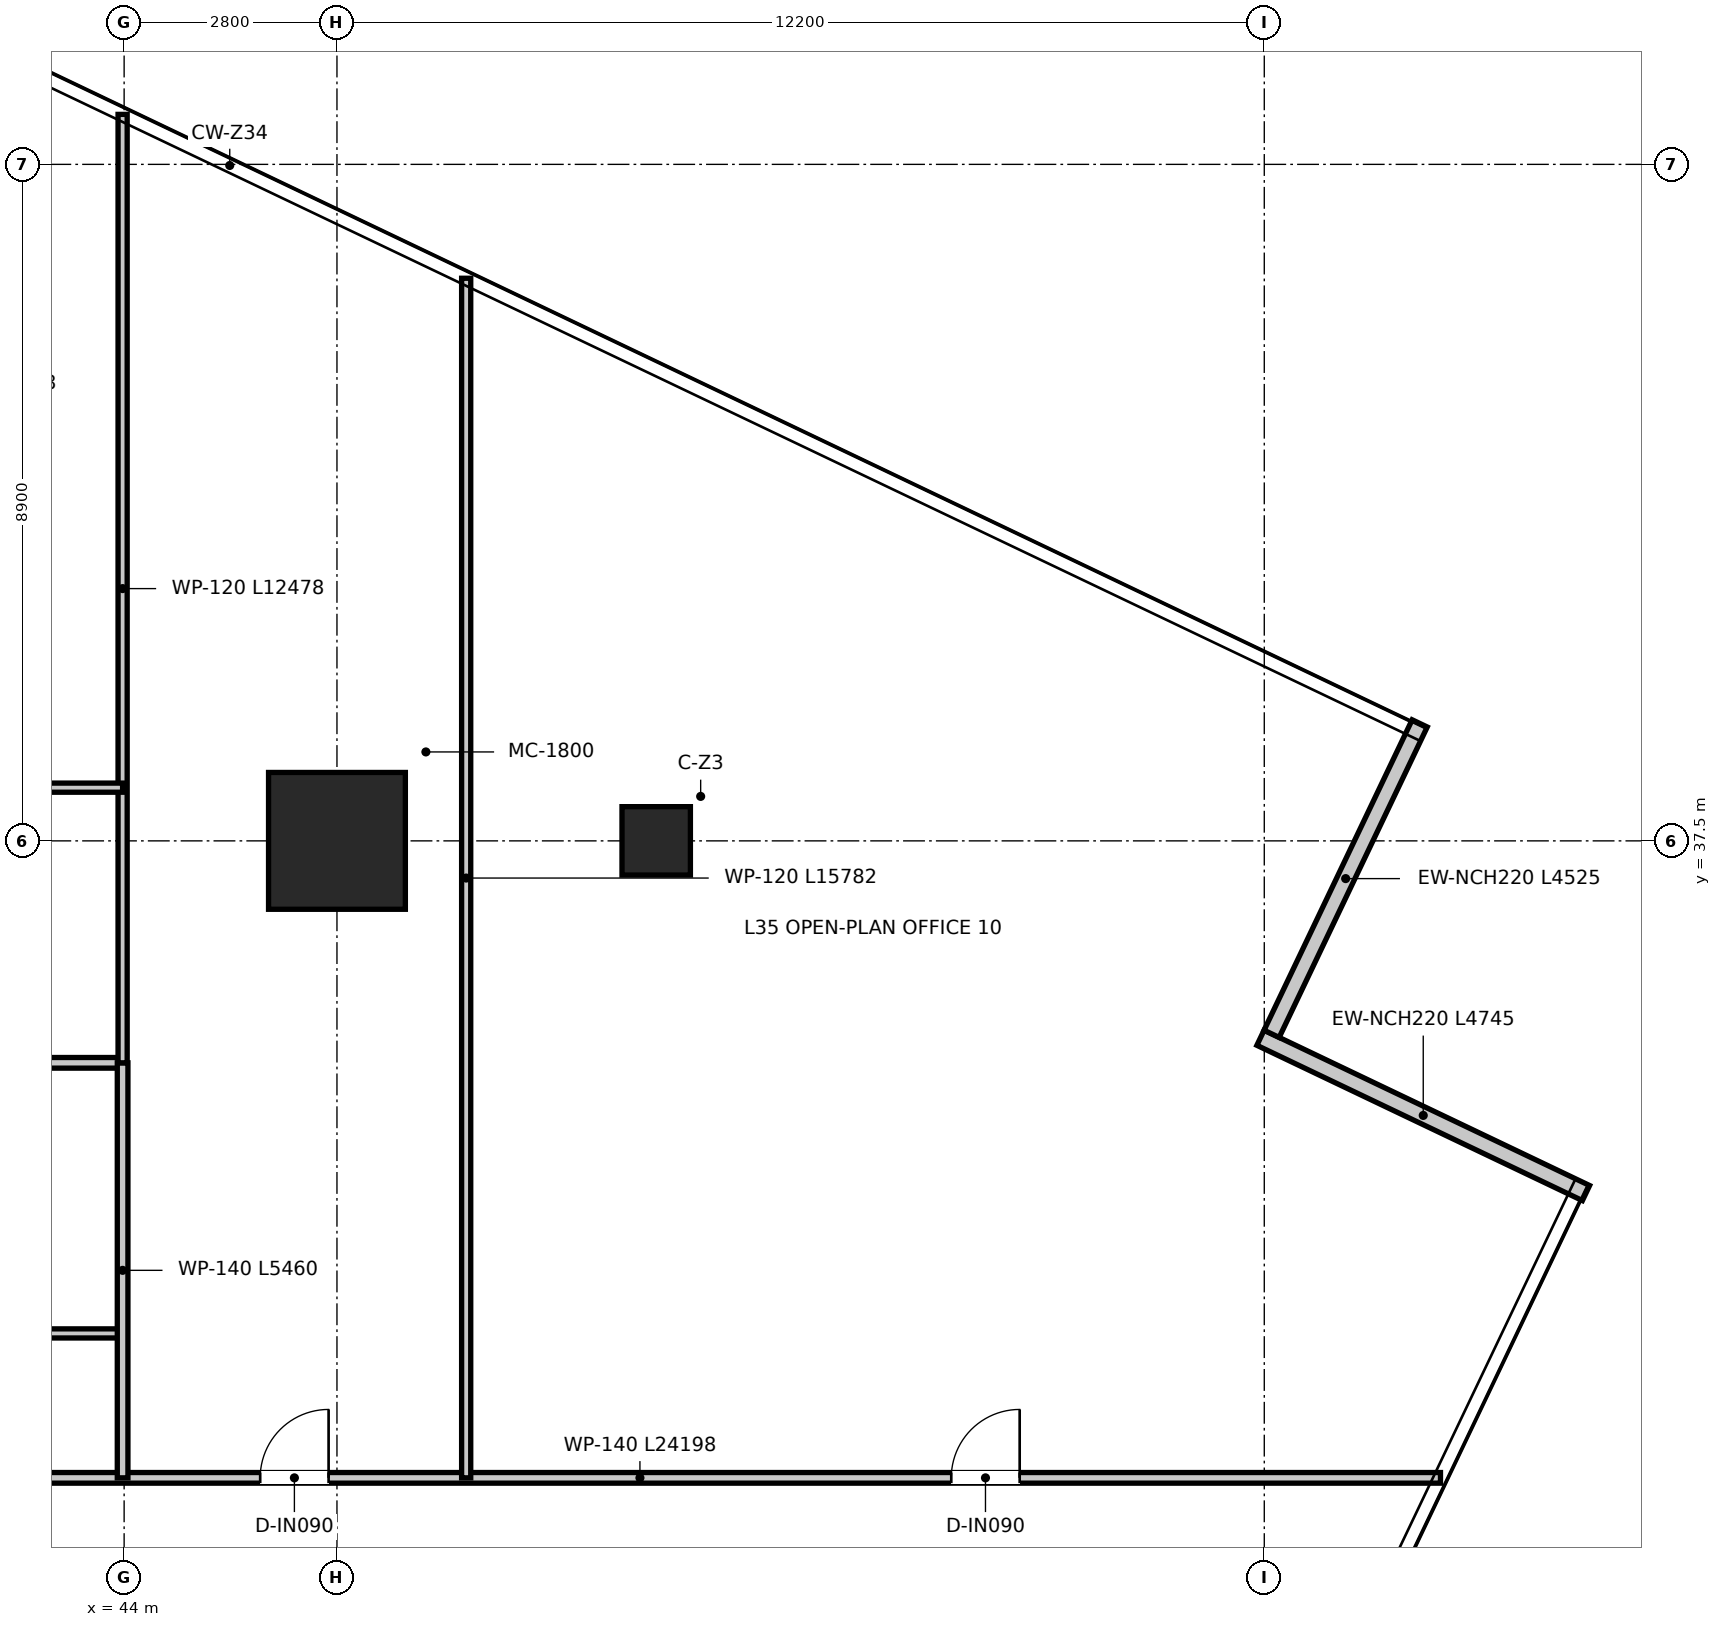
"""IFC4 building model, lengths in metres.
Left out: names, types, materials, properties, quantities, classifications, styles, units other than length and angle.
Written with IfcOpenShell. Run it as: python <this file> out.ifc"""

import sys

from ifc_helpers import new_model, si_unit, direction, frame, frame_2d, origin, origin_2d, place, context, subcontext, project, spatial, rectangle, extrude, source, transform, mapped, element, fill, save


model = new_model("IFC4")
c1 = context("Model", 3, precision=1e-05, world=origin(), true_north=direction((0.0, 1.0)))
c2 = subcontext(c1, "Body", "Model", "MODEL_VIEW")
j1 = project(units=[si_unit("LENGTHUNIT", "METRE"), si_unit("PLANEANGLEUNIT", "RADIAN")], contexts=[c1])
p1 = place(None, origin())
s1 = spatial("IfcSite", under=j1, at=p1, CompositionType="ELEMENT")
p2 = place(p1, origin())
s2 = spatial("IfcBuilding", under=s1, at=p2, CompositionType="ELEMENT")
p3 = place(p2, frame((0.0, 0.0, 146.2)))
s3 = spatial("IfcBuildingStorey", under=s2, at=p3, CompositionType="ELEMENT", Elevation=146.2)
m1 = source(origin(), c2, "Body", "SweptSolid", [
    extrude(rectangle(XDim=1.8, YDim=1.8, at=origin_2d()), origin(), (0.0, 0.0, 1.0), 3.95),
])
p4 = place(p3, frame((46.8, 37.5, 0.0), z_axis=(0.0, 0.0, 1.0), x_axis=(1.0, 0.0, 0.0)))
e1 = element("IfcColumn", 1, at=p4, inside=s3, PredefinedType="USERDEFINED", context=c2, shape_type="MappedRepresentation", body=[
    mapped(m1, transform((0.0, 0.0, 0.0), x_axis=(1.0, 0.0, 0.0), y_axis=(0.0, 1.0, 0.0), z_axis=(0.0, 0.0, 1.0), scale=1.0)),
])
m2 = source(origin(), c2, "Body", "SweptSolid", [
    extrude(rectangle(XDim=0.9, YDim=0.9, at=origin_2d()), origin(), (0.0, 0.0, 1.0), 3.95),
])
p5 = place(p3, frame((51.0, 37.5, 0.0), z_axis=(0.0, 0.0, 1.0), x_axis=(1.0, 0.0, 0.0)))
e2 = element("IfcColumn", 2, at=p5, inside=s3, PredefinedType="COLUMN", context=c2, shape_type="MappedRepresentation", body=[
    mapped(m2, transform((0.0, 0.0, 0.0), x_axis=(1.0, 0.0, 0.0), y_axis=(0.0, 1.0, 0.0), z_axis=(0.0, 0.0, 1.0), scale=1.0)),
])
p6 = place(p3, frame((63.233, 32.867, 0.0), z_axis=(0.0, 0.0, 1.0), x_axis=(-0.902587379521, 0.430506704164, 0.0)))
e3 = element("IfcWall", 3, at=p6, inside=s3, PredefinedType="ELEMENTEDWALL", context=c2, shape_type="SweptSolid", body=[
    extrude(rectangle(XDim=4.745, YDim=0.22, at=frame_2d((2.373, 0.0))), origin(), (0.0, 0.0, 1.0), 3.67),
])
p7 = place(p3, frame((59.097, 34.961, 0.0), z_axis=(0.0, 0.0, 1.0), x_axis=(0.43049686945, 0.902592070314, 0.0)))
e4 = element("IfcWall", 4, at=p7, inside=s3, PredefinedType="ELEMENTEDWALL", context=c2, shape_type="SweptSolid", body=[
    extrude(rectangle(XDim=4.525, YDim=0.22, at=frame_2d((2.262, 0.0))), origin(), (0.0, 0.0, 1.0), 3.67),
])
p8 = place(p3, frame((37.12, 29.12, 0.0), z_axis=(0.0, 0.0, 1.0), x_axis=(1.0, 0.0, 0.0)))
e5 = element("IfcWall", 5, at=p8, inside=s3, PredefinedType="PARTITIONING", context=c2, shape_type="SweptSolid", body=[
    extrude(rectangle(XDim=24.198, YDim=0.14, at=frame_2d((12.099, 0.0))), origin(), (0.0, 0.0, 1.0), 3.03),
])
p9 = place(p8, frame((3.03, 0.0, 0.0)))
e6 = element("IfcOpeningElement", 6, at=p9, cuts=e5, PredefinedType="OPENING", context=c2, shape_type="SweptSolid", body=[
    extrude(rectangle(XDim=0.9, YDim=2.1, at=frame_2d((0.45, 1.05))), frame((0.0, 0.08, 0.0), z_axis=(0.0, -1.0, 0.0), x_axis=(1.0, 0.0, 0.0)), (0.0, 0.0, 1.0), 0.16),
])
p10 = place(p8, frame((8.67, 0.0, 0.0)))
e7 = element("IfcOpeningElement", 7, at=p10, cuts=e5, PredefinedType="OPENING", context=c2, shape_type="SweptSolid", body=[
    extrude(rectangle(XDim=0.9, YDim=2.1, at=frame_2d((0.45, 1.05))), frame((0.0, 0.08, 0.0), z_axis=(0.0, -1.0, 0.0), x_axis=(1.0, 0.0, 0.0)), (0.0, 0.0, 1.0), 0.16),
])
p11 = place(p8, frame((17.762, 0.0, 0.0)))
e8 = element("IfcOpeningElement", 8, at=p11, cuts=e5, PredefinedType="OPENING", context=c2, shape_type="SweptSolid", body=[
    extrude(rectangle(XDim=0.9, YDim=2.1, at=frame_2d((0.45, 1.05))), frame((0.0, 0.08, 0.0), z_axis=(0.0, -1.0, 0.0), x_axis=(1.0, 0.0, 0.0)), (0.0, 0.0, 1.0), 0.16),
])
p12 = place(p3, frame((37.12, 31.02, 0.0), z_axis=(0.0, 0.0, 1.0), x_axis=(1.0, 0.0, 0.0)))
e9 = element("IfcWall", 9, at=p12, inside=s3, PredefinedType="PARTITIONING", context=c2, shape_type="SweptSolid", body=[
    extrude(rectangle(XDim=6.86, YDim=0.12, at=frame_2d((3.43, 0.0))), origin(), (0.0, 0.0, 1.0), 3.08),
])
p13 = place(p3, frame((37.12, 34.58, 0.0), z_axis=(0.0, 0.0, 1.0), x_axis=(1.0, 0.0, 0.0)))
e10 = element("IfcWall", 10, at=p13, inside=s3, PredefinedType="PARTITIONING", context=c2, shape_type="SweptSolid", body=[
    extrude(rectangle(XDim=6.86, YDim=0.14, at=frame_2d((3.43, 0.0))), origin(), (0.0, 0.0, 1.0), 3.08),
])
p14 = place(p3, frame((43.98, 29.12, 0.0), z_axis=(0.0, 0.0, 1.0), x_axis=(0.0, 1.0, 0.0)))
e11 = element("IfcWall", 11, at=p14, inside=s3, PredefinedType="PARTITIONING", context=c2, shape_type="SweptSolid", body=[
    extrude(rectangle(XDim=5.46, YDim=0.14, at=frame_2d((2.73, 0.0))), origin(), (0.0, 0.0, 1.0), 3.31),
])
p15 = place(p3, frame((43.98, 34.58, 0.0), z_axis=(0.0, 0.0, 1.0), x_axis=(0.0, 1.0, 0.0)))
e12 = element("IfcWall", 12, at=p15, inside=s3, PredefinedType="PARTITIONING", context=c2, shape_type="SweptSolid", body=[
    extrude(rectangle(XDim=12.478, YDim=0.12, at=frame_2d((6.239, 0.0))), origin(), (0.0, 0.0, 1.0), 3.03),
])
p16 = place(p3, frame((37.12, 38.2, 0.0), z_axis=(0.0, 0.0, 1.0), x_axis=(1.0, 0.0, 0.0)))
e13 = element("IfcWall", 13, at=p16, inside=s3, PredefinedType="PARTITIONING", context=c2, shape_type="SweptSolid", body=[
    extrude(rectangle(XDim=6.86, YDim=0.12, at=frame_2d((3.43, 0.0))), origin(), (0.0, 0.0, 1.0), 3.08),
])
p17 = place(p3, frame((48.5, 29.12, 0.0), z_axis=(0.0, 0.0, 1.0), x_axis=(0.0, 1.0, 0.0)))
e14 = element("IfcWall", 14, at=p17, inside=s3, PredefinedType="PARTITIONING", context=c2, shape_type="SweptSolid", body=[
    extrude(rectangle(XDim=15.781, YDim=0.12, at=frame_2d((7.891, 0.0))), origin(), (0.0, 0.0, 1.0), 3.08),
])
p18 = place(p10, origin())
e15 = element("IfcDoor", 15, at=p18, inside=s3, OperationType="SINGLE_SWING_RIGHT", PredefinedType="DOOR", context=c2, shape_type="SweptSolid", body=[
    extrude(rectangle(XDim=0.9, YDim=2.1, at=frame_2d((0.45, 1.05))), frame((0.0, 0.025, 0.0), z_axis=(0.0, -1.0, 0.0), x_axis=(1.0, 0.0, 0.0)), (0.0, 0.0, 1.0), 0.05),
])
fill(e7, e15)
p19 = place(p11, origin())
e16 = element("IfcDoor", 16, at=p19, inside=s3, OperationType="SINGLE_SWING_RIGHT", PredefinedType="DOOR", context=c2, shape_type="SweptSolid", body=[
    extrude(rectangle(XDim=0.9, YDim=2.1, at=frame_2d((0.45, 1.05))), frame((0.0, 0.025, 0.0), z_axis=(0.0, -1.0, 0.0), x_axis=(1.0, 0.0, 0.0)), (0.0, 0.0, 1.0), 0.05),
])
fill(e8, e16)
save(model, sys.argv[1])
